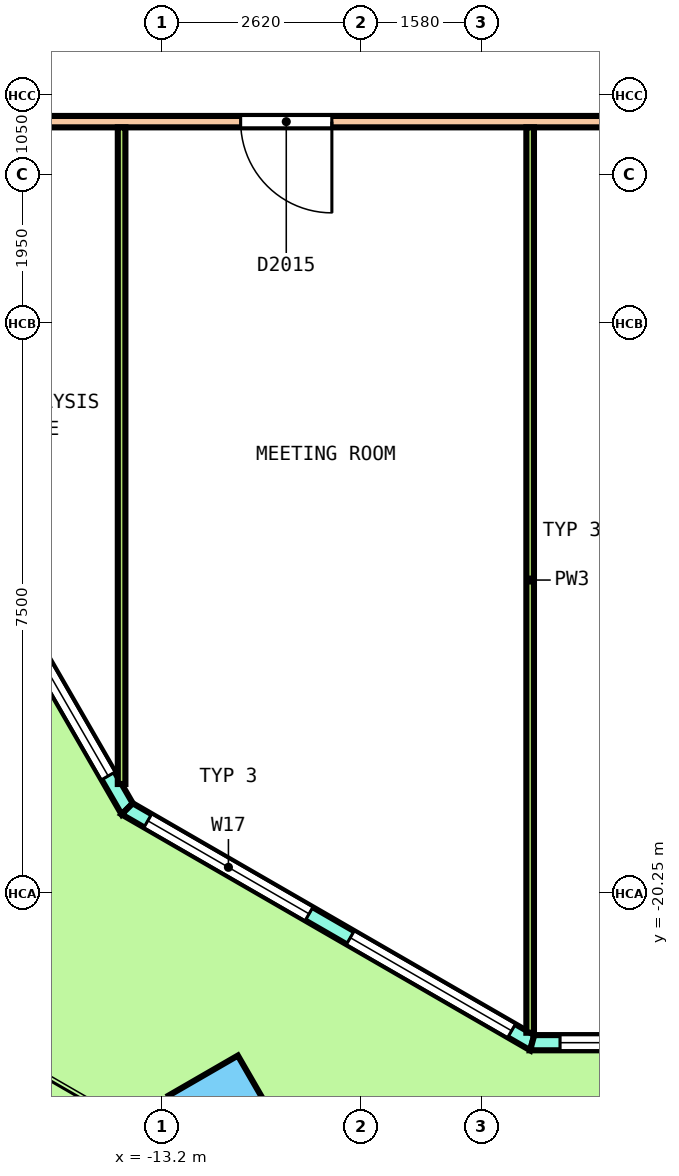
"""IFC4 building model, lengths in metres.
Left out: names, types, materials, properties, quantities, classifications, styles, units other than length and angle.
Written with IfcOpenShell. Run it as: python <this file> out.ifc"""

import sys

from ifc_helpers import new_model, si_unit, direction, frame, frame_2d, origin, origin_2d, place, context, subcontext, project, spatial, polyline, rectangle, outline, extrude, element, fill, save


model = new_model("IFC4")
c1 = context("Model", 3, precision=1e-05, world=origin(), true_north=direction((0.0, 1.0)))
c2 = subcontext(c1, "Body", "Model", "MODEL_VIEW")
j1 = project(units=[si_unit("LENGTHUNIT", "METRE"), si_unit("PLANEANGLEUNIT", "RADIAN")], contexts=[c1])
p1 = place(None, origin())
s1 = spatial("IfcSite", under=j1, at=p1, CompositionType="ELEMENT")
p2 = place(p1, origin())
s2 = spatial("IfcBuilding", under=s1, at=p2, CompositionType="ELEMENT")
p3 = place(p2, frame((0.0, 0.0, 237.4)))
s3 = spatial("IfcBuildingStorey", under=s2, at=p3, CompositionType="ELEMENT", Elevation=237.4)
p4 = place(p3, frame((-12.396, -23.104, 0.0), z_axis=(0.018113955825, -0.03141534774, 0.999342263957), x_axis=(0.86551973078, -0.499889444942, -0.031402841694)))
e1 = element("IfcColumn", 1, at=p4, inside=s3, PredefinedType="COLUMN", context=c2, shape_type="SweptSolid", body=[
    extrude(rectangle(XDim=1.05, YDim=1.05, at=origin_2d()), origin(), (0.0, 0.0, 1.0), 3.653),
])
p5 = place(p3, frame((-23.406, -2.26, 0.0), z_axis=(0.0, 0.0, 1.0), x_axis=(0.500001086243, -0.866024776641, 0.0)))
e2 = element("IfcWall", 2, at=p5, inside=s3, PredefinedType="SOLIDWALL", context=c2, shape_type="SweptSolid", body=[
    extrude(outline(polyline([(-0.027, -0.1), (1.002, -0.1), (2.031, -0.1), (3.059, -0.1), (4.088, -0.1), (5.117, -0.1), (6.146, -0.1), (7.175, -0.1), (8.203, -0.1), (9.232, -0.1), (10.261, -0.1), (11.29, -0.1), (12.318, -0.1), (13.347, -0.1), (14.376, -0.1), (15.405, -0.1), (16.433, -0.1), (17.462, -0.1), (18.491, -0.1), (19.52, -0.1), (19.466, 0.1), (18.443, 0.1), (17.42, 0.1), (16.396, 0.1), (15.373, 0.1), (14.35, 0.1), (13.327, 0.1), (12.304, 0.1), (11.281, 0.1), (10.258, 0.1), (9.235, 0.1), (8.212, 0.1), (7.188, 0.1), (6.166, 0.1), (5.142, 0.1), (4.119, 0.1), (3.096, 0.1), (2.073, 0.1), (1.05, 0.1), (0.027, 0.1), (-0.027, -0.1)])), origin(), (0.0, 0.0, 1.0), 3.7),
])
p6 = place(p5, frame((0.499, 0.0, 0.1)))
e3 = element("IfcOpeningElement", 3, at=p6, cuts=e2, PredefinedType="OPENING", context=c2, shape_type="SweptSolid", body=[
    extrude(rectangle(XDim=2.9, YDim=2.65, at=frame_2d((1.45, 1.325))), frame((0.0, 0.11, 0.0), z_axis=(0.0, -1.0, 0.0), x_axis=(1.0, 0.0, 0.0)), (0.0, 0.0, 1.0), 0.22),
])
p7 = place(p5, frame((4.398, 0.0, 0.1)))
e4 = element("IfcOpeningElement", 4, at=p7, cuts=e2, PredefinedType="OPENING", context=c2, shape_type="SweptSolid", body=[
    extrude(rectangle(XDim=2.9, YDim=2.65, at=frame_2d((1.45, 1.325))), frame((0.0, 0.11, 0.0), z_axis=(0.0, -1.0, 0.0), x_axis=(1.0, 0.0, 0.0)), (0.0, 0.0, 1.0), 0.22),
])
p8 = place(p5, frame((8.846, 0.0, 0.0)))
e5 = element("IfcOpeningElement", 5, at=p8, cuts=e2, PredefinedType="OPENING", context=c2, shape_type="SweptSolid", body=[
    extrude(rectangle(XDim=1.8, YDim=2.4, at=frame_2d((0.9, 1.2))), frame((0.0, 0.11, 0.0), z_axis=(0.0, -1.0, 0.0), x_axis=(1.0, 0.0, 0.0)), (0.0, 0.0, 1.0), 0.22),
])
p9 = place(p5, frame((8.846, 0.0, 2.55)))
e6 = element("IfcOpeningElement", 6, at=p9, cuts=e2, PredefinedType="OPENING", context=c2, shape_type="SweptSolid", body=[
    extrude(rectangle(XDim=1.8, YDim=0.2, at=frame_2d((0.9, 0.1))), frame((0.0, 0.11, 0.0), z_axis=(0.0, -1.0, 0.0), x_axis=(1.0, 0.0, 0.0)), (0.0, 0.0, 1.0), 0.22),
])
p10 = place(p5, frame((12.195, 0.0, 0.1)))
e7 = element("IfcOpeningElement", 7, at=p10, cuts=e2, PredefinedType="OPENING", context=c2, shape_type="SweptSolid", body=[
    extrude(rectangle(XDim=2.9, YDim=2.65, at=frame_2d((1.45, 1.325))), frame((0.0, 0.11, 0.0), z_axis=(0.0, -1.0, 0.0), x_axis=(1.0, 0.0, 0.0)), (0.0, 0.0, 1.0), 0.22),
])
p11 = place(p5, frame((16.094, 0.0, 0.1)))
e8 = element("IfcOpeningElement", 8, at=p11, cuts=e2, PredefinedType="OPENING", context=c2, shape_type="SweptSolid", body=[
    extrude(rectangle(XDim=2.9, YDim=2.65, at=frame_2d((1.45, 1.325))), frame((0.0, 0.11, 0.0), z_axis=(0.0, -1.0, 0.0), x_axis=(1.0, 0.0, 0.0)), (0.0, 0.0, 1.0), 0.22),
])
p12 = place(p3, frame((-13.66, -19.141, 0.0), z_axis=(0.0, 0.0, 1.0), x_axis=(0.866019727221, -0.500009831968, 0.0)))
e9 = element("IfcWall", 9, at=p12, inside=s3, PredefinedType="SOLIDWALL", context=c2, shape_type="SweptSolid", body=[
    extrude(outline(polyline([(-0.027, -0.1), (1.008, -0.1), (2.042, -0.1), (3.076, -0.1), (4.111, -0.1), (5.145, -0.1), (6.18, -0.1), (6.126, 0.1), (5.109, 0.1), (4.093, 0.1), (3.076, 0.1), (2.06, 0.1), (1.043, 0.1), (0.027, 0.1), (-0.027, -0.1)])), origin(), (0.0, 0.0, 1.0), 3.7),
])
p13 = place(p12, frame((0.313, 0.0, 0.1)))
e10 = element("IfcOpeningElement", 10, at=p13, cuts=e9, PredefinedType="OPENING", context=c2, shape_type="SweptSolid", body=[
    extrude(rectangle(XDim=2.45, YDim=2.65, at=frame_2d((1.225, 1.325))), frame((0.0, 0.11, 0.0), z_axis=(0.0, -1.0, 0.0), x_axis=(1.0, 0.0, 0.0)), (0.0, 0.0, 1.0), 0.22),
])
p14 = place(p12, frame((3.39, 0.0, 0.1)))
e11 = element("IfcOpeningElement", 11, at=p14, cuts=e9, PredefinedType="OPENING", context=c2, shape_type="SweptSolid", body=[
    extrude(rectangle(XDim=2.45, YDim=2.65, at=frame_2d((1.225, 1.325))), frame((0.0, 0.11, 0.0), z_axis=(0.0, -1.0, 0.0), x_axis=(1.0, 0.0, 0.0)), (0.0, 0.0, 1.0), 0.22),
])
p15 = place(p3, frame((-8.331, -22.217, 0.0), z_axis=(0.0, 0.0, 1.0), x_axis=(1.0, 0.0, 0.0)))
e12 = element("IfcWall", 12, at=p15, inside=s3, PredefinedType="SOLIDWALL", context=c2, shape_type="SweptSolid", body=[
    extrude(outline(polyline([(-0.027, -0.1), (1.018, -0.1), (2.063, -0.1), (3.107, -0.1), (4.152, -0.1), (5.197, -0.1), (6.242, -0.1), (7.287, -0.1), (8.331, -0.1), (9.376, -0.1), (10.421, -0.1), (11.466, -0.1), (12.51, -0.1), (13.555, -0.1), (14.6, -0.1), (15.645, -0.1), (16.689, -0.1), (16.636, 0.1), (15.598, 0.1), (14.56, 0.1), (13.521, 0.1), (12.483, 0.1), (11.446, 0.1), (10.407, 0.1), (9.369, 0.1), (8.331, 0.1), (7.293, 0.1), (6.255, 0.1), (5.217, 0.1), (4.179, 0.1), (3.141, 0.1), (2.103, 0.1), (1.065, 0.1), (0.027, 0.1), (-0.027, -0.1)])), origin(), (0.0, 0.0, 1.0), 3.7),
])
p16 = place(p15, frame((0.366, 0.0, 0.1)))
e13 = element("IfcOpeningElement", 13, at=p16, cuts=e12, PredefinedType="OPENING", context=c2, shape_type="SweptSolid", body=[
    extrude(rectangle(XDim=2.6, YDim=2.65, at=frame_2d((1.3, 1.325))), frame((0.0, 0.11, 0.0), z_axis=(0.0, -1.0, 0.0), x_axis=(1.0, 0.0, 0.0)), (0.0, 0.0, 1.0), 0.22),
])
p17 = place(p15, frame((3.699, 0.0, 0.1)))
e14 = element("IfcOpeningElement", 14, at=p17, cuts=e12, PredefinedType="OPENING", context=c2, shape_type="SweptSolid", body=[
    extrude(rectangle(XDim=2.6, YDim=2.65, at=frame_2d((1.3, 1.325))), frame((0.0, 0.11, 0.0), z_axis=(0.0, -1.0, 0.0), x_axis=(1.0, 0.0, 0.0)), (0.0, 0.0, 1.0), 0.22),
])
p18 = place(p15, frame((7.431, 0.0, 0.0)))
e15 = element("IfcOpeningElement", 15, at=p18, cuts=e12, PredefinedType="OPENING", context=c2, shape_type="SweptSolid", body=[
    extrude(rectangle(XDim=1.8, YDim=2.4, at=frame_2d((0.9, 1.2))), frame((0.0, 0.11, 0.0), z_axis=(0.0, -1.0, 0.0), x_axis=(1.0, 0.0, 0.0)), (0.0, 0.0, 1.0), 0.22),
])
p19 = place(p15, frame((7.431, 0.0, 2.55)))
e16 = element("IfcOpeningElement", 16, at=p19, cuts=e12, PredefinedType="OPENING", context=c2, shape_type="SweptSolid", body=[
    extrude(rectangle(XDim=1.8, YDim=0.2, at=frame_2d((0.9, 0.1))), frame((0.0, 0.11, 0.0), z_axis=(0.0, -1.0, 0.0), x_axis=(1.0, 0.0, 0.0)), (0.0, 0.0, 1.0), 0.22),
])
p20 = place(p15, frame((10.364, 0.0, 0.1)))
e17 = element("IfcOpeningElement", 17, at=p20, cuts=e12, PredefinedType="OPENING", context=c2, shape_type="SweptSolid", body=[
    extrude(rectangle(XDim=2.6, YDim=2.65, at=frame_2d((1.3, 1.325))), frame((0.0, 0.11, 0.0), z_axis=(0.0, -1.0, 0.0), x_axis=(1.0, 0.0, 0.0)), (0.0, 0.0, 1.0), 0.22),
])
p21 = place(p15, frame((13.696, 0.0, 0.1)))
e18 = element("IfcOpeningElement", 18, at=p21, cuts=e12, PredefinedType="OPENING", context=c2, shape_type="SweptSolid", body=[
    extrude(rectangle(XDim=2.6, YDim=2.65, at=frame_2d((1.3, 1.325))), frame((0.0, 0.11, 0.0), z_axis=(0.0, -1.0, 0.0), x_axis=(1.0, 0.0, 0.0)), (0.0, 0.0, 1.0), 0.22),
])
p22 = place(p3, frame((-15.275, -10.1, 0.0), z_axis=(0.0, 0.0, 1.0), x_axis=(1.0, 0.0, 0.0)))
e19 = element("IfcWall", 19, at=p22, inside=s3, PredefinedType="PARTITIONING", context=c2, shape_type="SweptSolid", body=[
    extrude(rectangle(XDim=30.55, YDim=0.15, at=frame_2d((15.275, 0.0))), origin(), (0.0, 0.0, 1.0), 2.8),
])
p23 = place(p22, frame((3.108, 0.0, 0.0)))
e20 = element("IfcOpeningElement", 20, at=p23, cuts=e19, PredefinedType="OPENING", context=c2, shape_type="SweptSolid", body=[
    extrude(rectangle(XDim=1.2, YDim=2.1, at=frame_2d((0.6, 1.05))), frame((0.0, 0.085, 0.0), z_axis=(0.0, -1.0, 0.0), x_axis=(1.0, 0.0, 0.0)), (0.0, 0.0, 1.0), 0.17),
])
p24 = place(p22, frame((8.464, 0.0, 0.0)))
e21 = element("IfcOpeningElement", 21, at=p24, cuts=e19, PredefinedType="OPENING", context=c2, shape_type="SweptSolid", body=[
    extrude(rectangle(XDim=1.2, YDim=2.1, at=frame_2d((0.6, 1.05))), frame((0.0, 0.085, 0.0), z_axis=(0.0, -1.0, 0.0), x_axis=(1.0, 0.0, 0.0)), (0.0, 0.0, 1.0), 0.17),
])
p25 = place(p22, frame((15.2, 0.0, 0.0)))
e22 = element("IfcOpeningElement", 22, at=p25, cuts=e19, PredefinedType="OPENING", context=c2, shape_type="SweptSolid", body=[
    extrude(rectangle(XDim=1.0, YDim=2.1, at=frame_2d((0.5, 1.05))), frame((0.0, 0.085, 0.0), z_axis=(0.0, -1.0, 0.0), x_axis=(1.0, 0.0, 0.0)), (0.0, 0.0, 1.0), 0.17),
])
p26 = place(p22, frame((23.325, 0.0, 0.0)))
e23 = element("IfcOpeningElement", 23, at=p26, cuts=e19, PredefinedType="OPENING", context=c2, shape_type="SweptSolid", body=[
    extrude(rectangle(XDim=1.2, YDim=2.1, at=frame_2d((0.6, 1.05))), frame((0.0, 0.085, 0.0), z_axis=(0.0, -1.0, 0.0), x_axis=(1.0, 0.0, 0.0)), (0.0, 0.0, 1.0), 0.17),
])
p27 = place(p22, frame((28.511, 0.0, 0.0)))
e24 = element("IfcOpeningElement", 24, at=p27, cuts=e19, PredefinedType="OPENING", context=c2, shape_type="SweptSolid", body=[
    extrude(rectangle(XDim=1.0, YDim=2.1, at=frame_2d((0.5, 1.05))), frame((0.0, 0.085, 0.0), z_axis=(0.0, -1.0, 0.0), x_axis=(1.0, 0.0, 0.0)), (0.0, 0.0, 1.0), 0.17),
])
p28 = place(p3, frame((-13.733, -18.814, 0.0), z_axis=(0.0, 0.0, 1.0), x_axis=(0.0, 1.0, 0.0)))
e25 = element("IfcWall", 25, at=p28, inside=s3, PredefinedType="PARTITIONING", context=c2, shape_type="SweptSolid", body=[
    extrude(rectangle(XDim=8.639, YDim=0.1, at=frame_2d((4.319, 0.0))), origin(), (0.0, 0.0, 1.0), 2.8),
])
p29 = place(p3, frame((-8.358, -22.086, 0.0), z_axis=(0.0, 0.0, 1.0), x_axis=(0.0, 1.0, 0.0)))
e26 = element("IfcWall", 26, at=p29, inside=s3, PredefinedType="PARTITIONING", context=c2, shape_type="SweptSolid", body=[
    extrude(rectangle(XDim=11.911, YDim=0.1, at=frame_2d((5.956, 0.0))), origin(), (0.0, 0.0, 1.0), 2.8),
])
p30 = place(p11, origin())
e27 = element("IfcWindow", 27, at=p30, inside=s3, PartitioningType="SINGLE_PANEL", PredefinedType="WINDOW", context=c2, shape_type="SweptSolid", body=[
    extrude(rectangle(XDim=2.9, YDim=2.65, at=frame_2d((1.45, 1.325))), frame((0.0, 0.03, 0.0), z_axis=(0.0, -1.0, 0.0), x_axis=(1.0, 0.0, 0.0)), (0.0, 0.0, 1.0), 0.06),
])
fill(e8, e27)
p31 = place(p13, origin())
e28 = element("IfcWindow", 28, at=p31, inside=s3, PartitioningType="SINGLE_PANEL", PredefinedType="WINDOW", context=c2, shape_type="SweptSolid", body=[
    extrude(rectangle(XDim=2.45, YDim=2.65, at=frame_2d((1.225, 1.325))), frame((0.0, 0.03, 0.0), z_axis=(0.0, -1.0, 0.0), x_axis=(1.0, 0.0, 0.0)), (0.0, 0.0, 1.0), 0.06),
])
fill(e10, e28)
p32 = place(p14, origin())
e29 = element("IfcWindow", 29, at=p32, inside=s3, PartitioningType="SINGLE_PANEL", PredefinedType="WINDOW", context=c2, shape_type="SweptSolid", body=[
    extrude(rectangle(XDim=2.45, YDim=2.65, at=frame_2d((1.225, 1.325))), frame((0.0, 0.03, 0.0), z_axis=(0.0, -1.0, 0.0), x_axis=(1.0, 0.0, 0.0)), (0.0, 0.0, 1.0), 0.06),
])
fill(e11, e29)
p33 = place(p16, origin())
e30 = element("IfcWindow", 30, at=p33, inside=s3, PartitioningType="SINGLE_PANEL", PredefinedType="WINDOW", context=c2, shape_type="SweptSolid", body=[
    extrude(rectangle(XDim=2.6, YDim=2.65, at=frame_2d((1.3, 1.325))), frame((0.0, 0.03, 0.0), z_axis=(0.0, -1.0, 0.0), x_axis=(1.0, 0.0, 0.0)), (0.0, 0.0, 1.0), 0.06),
])
fill(e13, e30)
p34 = place(p23, origin())
e31 = element("IfcDoor", 31, at=p34, inside=s3, OperationType="DOUBLE_DOOR_SINGLE_SWING", PredefinedType="DOOR", context=c2, shape_type="SweptSolid", body=[
    extrude(rectangle(XDim=1.2, YDim=2.1, at=frame_2d((0.6, 1.05))), frame((0.0, 0.025, 0.0), z_axis=(0.0, -1.0, 0.0), x_axis=(1.0, 0.0, 0.0)), (0.0, 0.0, 1.0), 0.05),
])
fill(e20, e31)
save(model, sys.argv[1])
